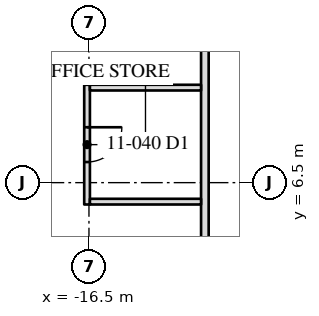
"""IFC4 building model, lengths in metres.
Left out: names, types, materials, properties, quantities, classifications, styles, units other than length and angle.
Written with IfcOpenShell. Run it as: python <this file> out.ifc"""

import sys

from ifc_helpers import new_model, si_unit, direction, frame, frame_2d, origin, place, context, subcontext, project, spatial, rectangle, extrude, element, fill, save


model = new_model("IFC4")
c1 = context("Model", 3, precision=1e-05, world=origin(), true_north=direction((0.0, 1.0)))
c2 = subcontext(c1, "Body", "Model", "MODEL_VIEW")
j1 = project(units=[si_unit("LENGTHUNIT", "METRE"), si_unit("PLANEANGLEUNIT", "RADIAN")], contexts=[c1])
p1 = place(None, origin())
s1 = spatial("IfcSite", under=j1, at=p1, CompositionType="ELEMENT")
p2 = place(p1, origin())
s2 = spatial("IfcBuilding", under=s1, at=p2, CompositionType="ELEMENT")
p3 = place(p2, frame((0.0, 0.0, 48.8)))
s3 = spatial("IfcBuildingStorey", under=s2, at=p3, CompositionType="ELEMENT", Elevation=48.8)
p4 = place(p3, frame((-13.45, 13.55, 0.0), z_axis=(0.0, 0.0, 1.0), x_axis=(0.0, -1.0, 0.0)))
e1 = element("IfcWall", 1, at=p4, inside=s3, PredefinedType="PARTITIONING", context=c2, shape_type="SweptSolid", body=[
    extrude(rectangle(XDim=26.9, YDim=0.2, at=frame_2d((13.45, 0.0))), origin(), (0.0, 0.0, 1.0), 3.91),
])
p5 = place(p3, frame((-16.55, 9.075, 0.0), z_axis=(0.0, 0.0, 1.0), x_axis=(0.0, -1.0, 0.0)))
e2 = element("IfcWall", 2, at=p5, inside=s3, PredefinedType="PARTITIONING", context=c2, shape_type="SweptSolid", body=[
    extrude(rectangle(XDim=3.15, YDim=0.15, at=frame_2d((1.575, 0.0))), origin(), (0.0, 0.0, 1.0), 3.91),
])
p6 = place(p5, frame((1.117, 0.0, 0.0)))
e3 = element("IfcOpeningElement", 3, at=p6, cuts=e2, PredefinedType="OPENING", context=c2, shape_type="SweptSolid", body=[
    extrude(rectangle(XDim=0.915, YDim=2.134, at=frame_2d((0.458, 1.067))), frame((0.0, 0.085, 0.0), z_axis=(0.0, -1.0, 0.0), x_axis=(1.0, 0.0, 0.0)), (0.0, 0.0, 1.0), 0.17),
])
for number, where, z_axis, x_axis in (
    (4, (-16.475, 9.0, 0.0), (0.0, 0.0, 1.0), (1.0, 0.0, 0.0)),
    (5, (-16.475, 6.0, 0.0), (0.0, 0.0, 1.0), (1.0, 0.0, 0.0)),
):
    element("IfcWall", number, at=place(p3, frame(where, z_axis=z_axis, x_axis=x_axis)), inside=s3, PredefinedType="PARTITIONING", context=c2, shape_type="SweptSolid", body=[
        extrude(rectangle(XDim=2.925, YDim=0.15, at=frame_2d((1.462, 0.0))), origin(), (0.0, 0.0, 1.0), 3.91),
    ])
p7 = place(p6, origin())
e6 = element("IfcDoor", 6, at=p7, inside=s3, OperationType="SINGLE_SWING_LEFT", PredefinedType="DOOR", context=c2, shape_type="SweptSolid", body=[
    extrude(rectangle(XDim=0.915, YDim=2.134, at=frame_2d((0.458, 1.067))), frame((0.0, 0.025, 0.0), z_axis=(0.0, -1.0, 0.0), x_axis=(1.0, 0.0, 0.0)), (0.0, 0.0, 1.0), 0.05),
])
fill(e3, e6)
save(model, sys.argv[1])
